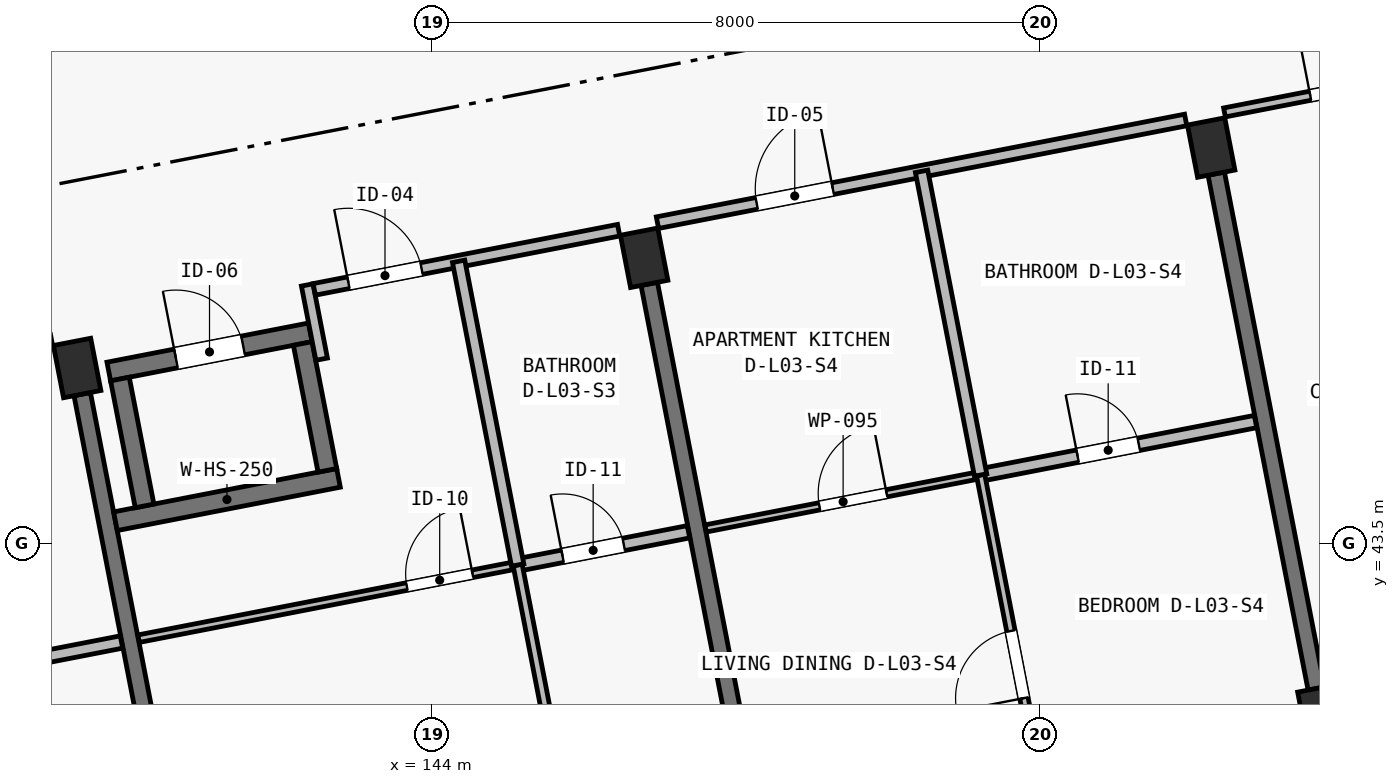
"""IFC4 building model, lengths in metres.
Left out: names, types, materials, properties, quantities, classifications, styles, units other than length and angle.
Written with IfcOpenShell. Run it as: python <this file> out.ifc"""

import sys

from ifc_helpers import new_model, si_unit, direction, frame, frame_2d, origin, origin_2d, place, context, subcontext, project, spatial, rectangle, extrude, element, fill, save


model = new_model("IFC4")
c1 = context("Model", 3, precision=1e-05, world=origin(), true_north=direction((0.0, 1.0)))
c2 = subcontext(c1, "Body", "Model", "MODEL_VIEW")
j1 = project(units=[si_unit("LENGTHUNIT", "METRE"), si_unit("PLANEANGLEUNIT", "RADIAN")], contexts=[c1])
p1 = place(None, origin())
s1 = spatial("IfcSite", under=j1, at=p1, CompositionType="ELEMENT")
p2 = place(p1, origin())
s2 = spatial("IfcBuilding", under=s1, at=p2, CompositionType="ELEMENT")
p3 = place(p2, frame((0.0, 0.0, 11.65)))
s3 = spatial("IfcBuildingStorey", under=s2, at=p3, CompositionType="ELEMENT", Elevation=11.65)
for number, where, z_axis, x_axis in (
    (1, (139.331, 45.811, 0.0), (0.0, 0.0, 1.0), (0.982, 0.191, 0.0)),
    (2, (146.791, 47.261, 0.0), (0.0, 0.0, 1.0), (0.982, 0.191, 0.0)),
    (3, (155.702, 41.251, 0.0), (0.0, 0.0, 1.0), (0.982, 0.191, 0.0)),
    (4, (154.252, 48.711, 0.0), (0.0, 0.0, 1.0), (0.982, 0.191, 0.0)),
):
    element("IfcColumn", number, at=place(p3, frame(where, z_axis=z_axis, x_axis=x_axis)), inside=s3, PredefinedType="COLUMN", context=c2, shape_type="SweptSolid", body=[
        extrude(rectangle(XDim=0.5, YDim=0.7, at=origin_2d()), origin(), (0.0, 0.0, 1.0), 3.25),
    ])
p4 = place(p3, frame((140.714, 38.694, 0.0), z_axis=(0.0, 0.0, 1.0), x_axis=(-0.190819465253, 0.981625148252, 0.0)))
e5 = element("IfcWall", 5, at=p4, inside=s3, PredefinedType="SHEAR", context=c2, shape_type="SweptSolid", body=[
    extrude(rectangle(XDim=6.9, YDim=0.22, at=frame_2d((3.45, 0.0))), origin(), (0.0, 0.0, 1.0), 2.5),
])
p5 = place(p3, frame((148.175, 40.144, 0.0), z_axis=(0.0, 0.0, 1.0), x_axis=(-0.190812837813, 0.981626436546, 0.0)))
e6 = element("IfcWall", 6, at=p5, inside=s3, PredefinedType="SHEAR", context=c2, shape_type="SweptSolid", body=[
    extrude(rectangle(XDim=6.9, YDim=0.22, at=frame_2d((3.45, 0.0))), origin(), (0.0, 0.0, 1.0), 2.5),
])
p6 = place(p3, frame((155.635, 41.594, 0.0), z_axis=(0.0, 0.0, 1.0), x_axis=(-0.190819465253, 0.981625148252, 0.0)))
e7 = element("IfcWall", 7, at=p6, inside=s3, PredefinedType="SHEAR", context=c2, shape_type="SweptSolid", body=[
    extrude(rectangle(XDim=6.9, YDim=0.22, at=frame_2d((3.45, 0.0))), origin(), (0.0, 0.0, 1.0), 2.5),
])
p7 = place(p3, frame((139.835, 43.795, 0.0), z_axis=(0.0, 0.0, 1.0), x_axis=(0.981624737535, 0.190821578075, 0.0)))
e8 = element("IfcWall", 8, at=p7, inside=s3, PredefinedType="SHEAR", context=c2, shape_type="SweptSolid", body=[
    extrude(rectangle(XDim=2.99, YDim=0.25, at=frame_2d((1.495, 0.0))), origin(), (0.0, 0.0, 1.0), 3.25),
])
p8 = place(p3, frame((139.748, 45.764, 0.0), z_axis=(0.0, 0.0, 1.0), x_axis=(0.981630445883, 0.190792210834, 0.0)))
e9 = element("IfcWall", 9, at=p8, inside=s3, PredefinedType="SHEAR", context=c2, shape_type="SweptSolid", body=[
    extrude(rectangle(XDim=2.7, YDim=0.25, at=frame_2d((1.35, 0.0))), origin(), (0.0, 0.0, 1.0), 3.25),
])
p9 = place(p8, frame((0.9, 0.0, 0.0)))
e10 = element("IfcOpeningElement", 10, at=p9, cuts=e9, PredefinedType="OPENING", context=c2, shape_type="SweptSolid", body=[
    extrude(rectangle(XDim=0.9, YDim=2.05, at=frame_2d((0.45, 1.025))), frame((0.0, 0.14, 0.0), z_axis=(0.0, -1.0, 0.0), x_axis=(1.0, 0.0, 0.0)), (0.0, 0.0, 1.0), 0.28),
])
for number, where, z_axis, x_axis in (
    (11, (140.218, 43.997, 0.0), (0.0, 0.0, 1.0), (-0.191, 0.982, 0.0)),
    (12, (142.623, 44.464, 0.0), (0.0, 0.0, 1.0), (-0.191, 0.982, 0.0)),
):
    element("IfcWall", number, at=place(p3, frame(where, z_axis=z_axis, x_axis=x_axis)), inside=s3, PredefinedType="SHEAR", context=c2, shape_type="SweptSolid", body=[
        extrude(rectangle(XDim=1.7, YDim=0.25, at=frame_2d((0.85, 0.0))), origin(), (0.0, 0.0, 1.0), 3.25),
    ])
p10 = place(p3, frame((132.046, 44.823, 0.0), z_axis=(0.0, 0.0, 1.0), x_axis=(0.9816234647, 0.190828125677, 0.0)))
e13 = element("IfcWall", 13, at=p10, inside=s3, PredefinedType="PARTITIONING", context=c2, shape_type="SweptSolid", body=[
    extrude(rectangle(XDim=7.08, YDim=0.155, at=frame_2d((3.54, 0.0))), origin(), (0.0, 0.0, 1.0), 2.97),
])
p11 = place(p10, frame((1.33, 0.0, 0.0)))
e14 = element("IfcOpeningElement", 14, at=p11, cuts=e13, PredefinedType="OPENING", context=c2, shape_type="SweptSolid", body=[
    extrude(rectangle(XDim=0.98, YDim=2.15, at=frame_2d((0.49, 1.075))), frame((0.0, 0.093, 0.0), z_axis=(0.0, -1.0, 0.0), x_axis=(1.0, 0.0, 0.0)), (0.0, 0.0, 1.0), 0.185),
])
p12 = place(p3, frame((136.297, 41.503, 0.0), z_axis=(0.0, 0.0, 1.0), x_axis=(0.981628834294, 0.190800502313, 0.0)))
e15 = element("IfcWall", 15, at=p12, inside=s3, PredefinedType="PLUMBINGWALL", context=c2, shape_type="SweptSolid", body=[
    extrude(rectangle(XDim=3.685, YDim=0.165, at=frame_2d((1.843, 0.0))), origin(), (0.0, 0.0, 1.0), 2.97),
])
p13 = place(p12, frame((1.3, 0.0, 0.0)))
e16 = element("IfcOpeningElement", 16, at=p13, cuts=e15, PredefinedType="OPENING", context=c2, shape_type="SweptSolid", body=[
    extrude(rectangle(XDim=0.82, YDim=2.08, at=frame_2d((0.41, 1.04))), frame((0.0, 0.097, 0.0), z_axis=(0.0, -1.0, 0.0), x_axis=(1.0, 0.0, 0.0)), (0.0, 0.0, 1.0), 0.195),
])
p14 = place(p3, frame((142.548, 45.927, 0.0), z_axis=(0.0, 0.0, 1.0), x_axis=(-0.190639805817, 0.981660055436, 0.0)))
e17 = element("IfcWall", 17, at=p14, inside=s3, PredefinedType="PARTITIONING", context=c2, shape_type="SweptSolid", body=[
    extrude(rectangle(XDim=0.995, YDim=0.155, at=frame_2d((0.498, 0.0))), origin(), (0.0, 0.0, 1.0), 2.97),
])
p15 = place(p3, frame((142.451, 46.845, 0.0), z_axis=(0.0, 0.0, 1.0), x_axis=(0.981636249117, 0.190762350636, 0.0)))
e18 = element("IfcWall", 18, at=p15, inside=s3, PredefinedType="PARTITIONING", context=c2, shape_type="SweptSolid", body=[
    extrude(rectangle(XDim=4.08, YDim=0.155, at=frame_2d((2.04, 0.0))), origin(), (0.0, 0.0, 1.0), 2.97),
])
p16 = place(p15, frame((0.458, 0.0, 0.0)))
e19 = element("IfcOpeningElement", 19, at=p16, cuts=e18, PredefinedType="OPENING", context=c2, shape_type="SweptSolid", body=[
    extrude(rectangle(XDim=0.98, YDim=2.15, at=frame_2d((0.49, 1.075))), frame((0.0, 0.093, 0.0), z_axis=(0.0, -1.0, 0.0), x_axis=(1.0, 0.0, 0.0)), (0.0, 0.0, 1.0), 0.185),
])
p17 = place(p3, frame((140.14, 42.25, 0.0), z_axis=(0.0, 0.0, 1.0), x_axis=(0.98162014174, 0.190845218255, 0.0)))
e20 = element("IfcWall", 20, at=p17, inside=s3, PredefinedType="PARTITIONING", context=c2, shape_type="SweptSolid", body=[
    extrude(rectangle(XDim=5.08, YDim=0.1, at=frame_2d((2.54, 0.0))), origin(), (0.0, 0.0, 1.0), 2.97),
])
p18 = place(p17, frame((3.595, 0.0, 0.0)))
e21 = element("IfcOpeningElement", 21, at=p18, cuts=e20, PredefinedType="OPENING", context=c2, shape_type="SweptSolid", body=[
    extrude(rectangle(XDim=0.88, YDim=2.1, at=frame_2d((0.44, 1.05))), frame((0.0, 0.065, 0.0), z_axis=(0.0, -1.0, 0.0), x_axis=(1.0, 0.0, 0.0)), (0.0, 0.0, 1.0), 0.13),
])
p19 = place(p3, frame((145.127, 43.219, 0.0), z_axis=(0.0, 0.0, 1.0), x_axis=(0.981644229922, 0.190721277946, 0.0)))
e22 = element("IfcWall", 22, at=p19, inside=s3, PredefinedType="PLUMBINGWALL", context=c2, shape_type="SweptSolid", body=[
    extrude(rectangle(XDim=2.29, YDim=0.165, at=frame_2d((1.145, 0.0))), origin(), (0.0, 0.0, 1.0), 2.97),
])
p20 = place(p19, frame((0.602, 0.0, 0.0)))
e23 = element("IfcOpeningElement", 23, at=p20, cuts=e22, PredefinedType="OPENING", context=c2, shape_type="SweptSolid", body=[
    extrude(rectangle(XDim=0.82, YDim=2.08, at=frame_2d((0.41, 1.04))), frame((0.0, 0.097, 0.0), z_axis=(0.0, -1.0, 0.0), x_axis=(1.0, 0.0, 0.0)), (0.0, 0.0, 1.0), 0.195),
])
p21 = place(p3, frame((145.955, 38.959, 0.0), z_axis=(0.0, 0.0, 1.0), x_axis=(-0.190812443151, 0.981626513262, 0.0)))
e24 = element("IfcWall", 24, at=p21, inside=s3, PredefinedType="PARTITIONING", context=c2, shape_type="SweptSolid", body=[
    extrude(rectangle(XDim=4.34, YDim=0.12, at=frame_2d((2.17, 0.0))), origin(), (0.0, 0.0, 1.0), 2.97),
])
p22 = place(p21, frame((1.35, 0.0, 0.0)))
e25 = element("IfcOpeningElement", 25, at=p22, cuts=e24, PredefinedType="OPENING", context=c2, shape_type="SweptSolid", body=[
    extrude(rectangle(XDim=0.9, YDim=2.1, at=frame_2d((0.45, 1.05))), frame((0.0, 0.075, 0.0), z_axis=(0.0, -1.0, 0.0), x_axis=(1.0, 0.0, 0.0)), (0.0, 0.0, 1.0), 0.15),
])
p23 = place(p3, frame((145.127, 43.219, 0.0), z_axis=(0.0, 0.0, 1.0), x_axis=(-0.19081827974, 0.981625378705, 0.0)))
e26 = element("IfcWall", 26, at=p23, inside=s3, PredefinedType="PLUMBINGWALL", context=c2, shape_type="SweptSolid", body=[
    extrude(rectangle(XDim=4.07, YDim=0.165, at=frame_2d((2.035, 0.0))), origin(), (0.0, 0.0, 1.0), 2.97),
])
p24 = place(p3, frame((146.966, 47.723, 0.0), z_axis=(0.0, 0.0, 1.0), x_axis=(0.981629923556, 0.190794898199, 0.0)))
e27 = element("IfcWall", 27, at=p24, inside=s3, PredefinedType="PARTITIONING", context=c2, shape_type="SweptSolid", body=[
    extrude(rectangle(XDim=7.08, YDim=0.155, at=frame_2d((3.54, 0.0))), origin(), (0.0, 0.0, 1.0), 2.97),
])
p25 = place(p24, frame((1.33, 0.0, 0.0)))
e28 = element("IfcOpeningElement", 28, at=p25, cuts=e27, PredefinedType="OPENING", context=c2, shape_type="SweptSolid", body=[
    extrude(rectangle(XDim=1.02, YDim=2.2, at=frame_2d((0.51, 1.1))), frame((0.0, 0.093, 0.0), z_axis=(0.0, -1.0, 0.0), x_axis=(1.0, 0.0, 0.0)), (0.0, 0.0, 1.0), 0.185),
])
p26 = place(p3, frame((147.601, 43.7, 0.0), z_axis=(0.0, 0.0, 1.0), x_axis=(0.981628834294, 0.190800502313, 0.0)))
e29 = element("IfcWall", 29, at=p26, inside=s3, PredefinedType="PARTITIONING", context=c2, shape_type="SweptSolid", body=[
    extrude(rectangle(XDim=3.685, YDim=0.095, at=frame_2d((1.843, 0.0))), origin(), (0.0, 0.0, 1.0), 2.97),
])
p27 = place(p26, frame((1.525, 0.0, 0.0)))
e30 = element("IfcOpeningElement", 30, at=p27, cuts=e29, PredefinedType="OPENING", context=c2, shape_type="SweptSolid", body=[
    extrude(rectangle(XDim=0.9, YDim=2.1, at=frame_2d((0.45, 1.05))), frame((0.0, 0.062, 0.0), z_axis=(0.0, -1.0, 0.0), x_axis=(1.0, 0.0, 0.0)), (0.0, 0.0, 1.0), 0.125),
])
p28 = place(p3, frame((151.218, 44.403, 0.0), z_axis=(0.0, 0.0, 1.0), x_axis=(0.981626422232, 0.190812911449, 0.0)))
e31 = element("IfcWall", 31, at=p28, inside=s3, PredefinedType="PLUMBINGWALL", context=c2, shape_type="SweptSolid", body=[
    extrude(rectangle(XDim=3.685, YDim=0.165, at=frame_2d((1.842, 0.0))), origin(), (0.0, 0.0, 1.0), 2.97),
])
p29 = place(p28, frame((1.3, 0.0, 0.0)))
e32 = element("IfcOpeningElement", 32, at=p29, cuts=e31, PredefinedType="OPENING", context=c2, shape_type="SweptSolid", body=[
    extrude(rectangle(XDim=0.82, YDim=2.08, at=frame_2d((0.41, 1.04))), frame((0.0, 0.097, 0.0), z_axis=(0.0, -1.0, 0.0), x_axis=(1.0, 0.0, 0.0)), (0.0, 0.0, 1.0), 0.195),
])
p30 = place(p3, frame((152.046, 40.143, 0.0), z_axis=(0.0, 0.0, 1.0), x_axis=(-0.190812443151, 0.981626513262, 0.0)))
e33 = element("IfcWall", 33, at=p30, inside=s3, PredefinedType="PARTITIONING", context=c2, shape_type="SweptSolid", body=[
    extrude(rectangle(XDim=4.34, YDim=0.11, at=frame_2d((2.17, 0.0))), origin(), (0.0, 0.0, 1.0), 2.97),
])
p31 = place(p30, frame((1.35, 0.0, 0.0)))
e34 = element("IfcOpeningElement", 34, at=p31, cuts=e33, PredefinedType="OPENING", context=c2, shape_type="SweptSolid", body=[
    extrude(rectangle(XDim=0.9, YDim=2.1, at=frame_2d((0.45, 1.05))), frame((0.0, 0.07, 0.0), z_axis=(0.0, -1.0, 0.0), x_axis=(1.0, 0.0, 0.0)), (0.0, 0.0, 1.0), 0.14),
])
p32 = place(p3, frame((151.218, 44.403, 0.0), z_axis=(0.0, 0.0, 1.0), x_axis=(-0.190807044121, 0.981627562731, 0.0)))
e35 = element("IfcWall", 35, at=p32, inside=s3, PredefinedType="PLUMBINGWALL", context=c2, shape_type="SweptSolid", body=[
    extrude(rectangle(XDim=4.07, YDim=0.165, at=frame_2d((2.035, 0.0))), origin(), (0.0, 0.0, 1.0), 2.97),
])
p33 = place(p3, frame((154.427, 49.173, 0.0), z_axis=(0.0, 0.0, 1.0), x_axis=(0.981628202514, 0.190803752658, 0.0)))
e36 = element("IfcWall", 36, at=p33, inside=s3, PredefinedType="PARTITIONING", context=c2, shape_type="SweptSolid", body=[
    extrude(rectangle(XDim=4.66, YDim=0.12, at=frame_2d((2.33, 0.0))), origin(), (0.0, 0.0, 1.0), 2.97),
])
p34 = place(p33, frame((1.15, 0.0, 0.0)))
e37 = element("IfcOpeningElement", 37, at=p34, cuts=e36, PredefinedType="OPENING", context=c2, shape_type="SweptSolid", body=[
    extrude(rectangle(XDim=1.15, YDim=2.15, at=frame_2d((0.575, 1.075))), frame((0.0, 0.075, 0.0), z_axis=(0.0, -1.0, 0.0), x_axis=(1.0, 0.0, 0.0)), (0.0, 0.0, 1.0), 0.15),
])
p35 = place(p16, origin())
e38 = element("IfcDoor", 38, at=p35, inside=s3, OperationType="SINGLE_SWING_LEFT", PredefinedType="DOOR", context=c2, shape_type="SweptSolid", body=[
    extrude(rectangle(XDim=0.98, YDim=2.15, at=frame_2d((0.49, 1.075))), frame((0.0, 0.025, 0.0), z_axis=(0.0, -1.0, 0.0), x_axis=(1.0, 0.0, 0.0)), (0.0, 0.0, 1.0), 0.05),
])
fill(e19, e38)
p36 = place(p18, origin())
e39 = element("IfcDoor", 39, at=p36, inside=s3, OperationType="SINGLE_SWING_RIGHT", PredefinedType="DOOR", context=c2, shape_type="SweptSolid", body=[
    extrude(rectangle(XDim=0.88, YDim=2.1, at=frame_2d((0.44, 1.05))), frame((0.0, 0.025, 0.0), z_axis=(0.0, -1.0, 0.0), x_axis=(1.0, 0.0, 0.0)), (0.0, 0.0, 1.0), 0.05),
])
fill(e21, e39)
p37 = place(p20, origin())
e40 = element("IfcDoor", 40, at=p37, inside=s3, OperationType="SINGLE_SWING_LEFT", PredefinedType="DOOR", context=c2, shape_type="SweptSolid", body=[
    extrude(rectangle(XDim=0.82, YDim=2.08, at=frame_2d((0.41, 1.04))), frame((0.0, 0.025, 0.0), z_axis=(0.0, -1.0, 0.0), x_axis=(1.0, 0.0, 0.0)), (0.0, 0.0, 1.0), 0.05),
])
fill(e23, e40)
p38 = place(p25, origin())
e41 = element("IfcDoor", 41, at=p38, inside=s3, OperationType="SINGLE_SWING_RIGHT", PredefinedType="DOOR", context=c2, shape_type="SweptSolid", body=[
    extrude(rectangle(XDim=1.02, YDim=2.2, at=frame_2d((0.51, 1.1))), frame((0.0, 0.025, 0.0), z_axis=(0.0, -1.0, 0.0), x_axis=(1.0, 0.0, 0.0)), (0.0, 0.0, 1.0), 0.05),
])
fill(e28, e41)
p39 = place(p27, origin())
e42 = element("IfcDoor", 42, at=p39, inside=s3, OperationType="SINGLE_SWING_RIGHT", PredefinedType="DOOR", context=c2, shape_type="SweptSolid", body=[
    extrude(rectangle(XDim=0.9, YDim=2.1, at=frame_2d((0.45, 1.05))), frame((0.0, 0.025, 0.0), z_axis=(0.0, -1.0, 0.0), x_axis=(1.0, 0.0, 0.0)), (0.0, 0.0, 1.0), 0.05),
])
fill(e30, e42)
p40 = place(p29, origin())
e43 = element("IfcDoor", 43, at=p40, inside=s3, OperationType="SINGLE_SWING_LEFT", PredefinedType="DOOR", context=c2, shape_type="SweptSolid", body=[
    extrude(rectangle(XDim=0.82, YDim=2.08, at=frame_2d((0.41, 1.04))), frame((0.0, 0.025, 0.0), z_axis=(0.0, -1.0, 0.0), x_axis=(1.0, 0.0, 0.0)), (0.0, 0.0, 1.0), 0.05),
])
fill(e32, e43)
p41 = place(p31, origin())
e44 = element("IfcDoor", 44, at=p41, inside=s3, OperationType="SINGLE_SWING_LEFT", PredefinedType="DOOR", context=c2, shape_type="SweptSolid", body=[
    extrude(rectangle(XDim=0.9, YDim=2.1, at=frame_2d((0.45, 1.05))), frame((0.0, 0.025, 0.0), z_axis=(0.0, -1.0, 0.0), x_axis=(1.0, 0.0, 0.0)), (0.0, 0.0, 1.0), 0.05),
])
fill(e34, e44)
p42 = place(p34, origin())
e45 = element("IfcDoor", 45, at=p42, inside=s3, OperationType="SINGLE_SWING_LEFT", PredefinedType="DOOR", context=c2, shape_type="SweptSolid", body=[
    extrude(rectangle(XDim=1.15, YDim=2.15, at=frame_2d((0.575, 1.075))), frame((0.0, 0.025, 0.0), z_axis=(0.0, -1.0, 0.0), x_axis=(1.0, 0.0, 0.0)), (0.0, 0.0, 1.0), 0.05),
])
fill(e37, e45)
p43 = place(p9, origin())
e46 = element("IfcDoor", 46, at=p43, inside=s3, OperationType="SINGLE_SWING_LEFT", PredefinedType="DOOR", context=c2, shape_type="SweptSolid", body=[
    extrude(rectangle(XDim=0.9, YDim=2.05, at=frame_2d((0.45, 1.025))), frame((0.0, 0.025, 0.0), z_axis=(0.0, -1.0, 0.0), x_axis=(1.0, 0.0, 0.0)), (0.0, 0.0, 1.0), 0.05),
])
fill(e10, e46)
save(model, sys.argv[1])
